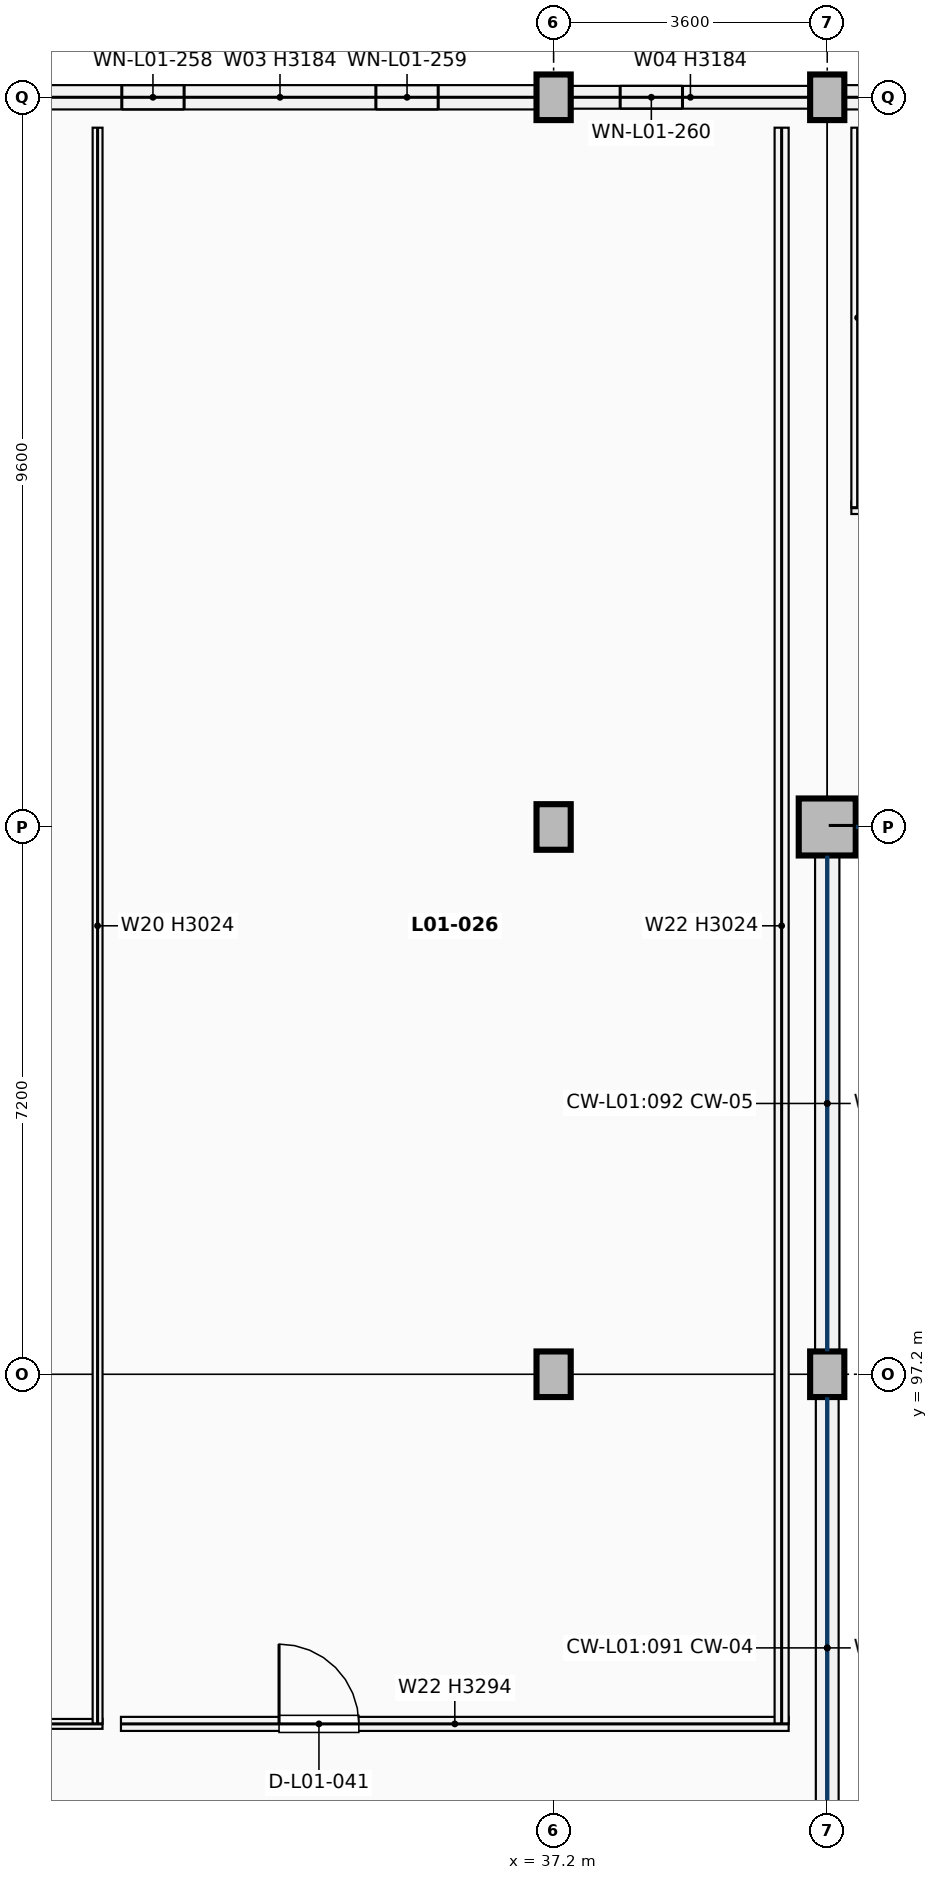
"""IFC4 building model, lengths in metres.
Left out: names, types, materials, properties, quantities, classifications, styles, units other than length and angle.
Written with IfcOpenShell. Run it as: python <this file> out.ifc"""

import sys

from ifc_helpers import new_model, si_unit, direction, frame, frame_2d, origin, origin_2d, place, context, subcontext, project, spatial, rectangle, extrude, element, fill, save


model = new_model("IFC4")
c1 = context("Model", 3, precision=1e-05, world=origin(), true_north=direction((0.0, 1.0)))
c2 = subcontext(c1, "Body", "Model", "MODEL_VIEW")
j1 = project(units=[si_unit("LENGTHUNIT", "METRE"), si_unit("PLANEANGLEUNIT", "RADIAN")], contexts=[c1])
p1 = place(None, origin())
s1 = spatial("IfcSite", under=j1, at=p1, CompositionType="ELEMENT")
p2 = place(p1, origin())
s2 = spatial("IfcBuilding", under=s1, at=p2, CompositionType="ELEMENT")
p3 = place(p2, frame((0.0, 0.0, 5.1)))
s3 = spatial("IfcBuildingStorey", under=s2, at=p3, CompositionType="ELEMENT", Elevation=5.1)
for number, where, z_axis, x_axis in (
    (1, (37.2, 97.2, 0.0), (0.0, 0.0, 1.0), (1.0, 0.0, 0.0)),
    (2, (37.2, 104.4, 0.0), (0.0, 0.0, 1.0), (1.0, 0.0, 0.0)),
    (3, (37.2, 114.0, 0.0), (0.0, 0.0, 1.0), (1.0, 0.0, 0.0)),
    (4, (40.8, 97.2, 0.0), (0.0, 0.0, 1.0), (1.0, 0.0, 0.0)),
):
    element("IfcColumn", number, at=place(p3, frame(where, z_axis=z_axis, x_axis=x_axis)), inside=s3, PredefinedType="COLUMN", context=c2, shape_type="SweptSolid", body=[
        extrude(rectangle(XDim=0.45, YDim=0.6, at=origin_2d()), origin(), (0.0, 0.0, 1.0), 4.42),
    ])
p4 = place(p3, frame((40.8, 104.4, 0.0), z_axis=(0.0, 0.0, 1.0), x_axis=(1.0, 0.0, 0.0)))
e5 = element("IfcColumn", 5, at=p4, inside=s3, PredefinedType="COLUMN", context=c2, shape_type="SweptSolid", body=[
    extrude(rectangle(XDim=0.75, YDim=0.75, at=origin_2d()), origin(), (0.0, 0.0, 1.0), 4.42),
])
p5 = place(p3, frame((40.8, 114.0, 0.0), z_axis=(0.0, 0.0, 1.0), x_axis=(1.0, 0.0, 0.0)))
e6 = element("IfcColumn", 6, at=p5, inside=s3, PredefinedType="COLUMN", context=c2, shape_type="SweptSolid", body=[
    extrude(rectangle(XDim=0.45, YDim=0.6, at=origin_2d()), origin(), (0.0, 0.0, 1.0), 4.42),
])
p6 = place(p3, frame((30.227, 114.0, 0.0), z_axis=(0.0, 0.0, 1.0), x_axis=(1.0, 0.0, 0.0)))
e7 = element("IfcWall", 7, at=p6, inside=s3, PredefinedType="SOLIDWALL", context=c2, shape_type="SweptSolid", body=[
    extrude(rectangle(XDim=6.746, YDim=0.32, at=frame_2d((3.373, 0.0))), origin(), (0.0, 0.0, 1.0), 3.184),
])
p7 = place(p6, frame((1.292, 0.0, 0.75)))
e8 = element("IfcOpeningElement", 8, at=p7, cuts=e7, PredefinedType="OPENING", context=c2, shape_type="SweptSolid", body=[
    extrude(rectangle(XDim=0.82, YDim=2.22, at=frame_2d((0.41, 1.11))), frame((0.0, 0.17, 0.0), z_axis=(0.0, -1.0, 0.0), x_axis=(1.0, 0.0, 0.0)), (0.0, 0.0, 1.0), 0.34),
])
p8 = place(p6, frame((4.635, 0.0, 0.75)))
e9 = element("IfcOpeningElement", 9, at=p8, cuts=e7, PredefinedType="OPENING", context=c2, shape_type="SweptSolid", body=[
    extrude(rectangle(XDim=0.82, YDim=2.22, at=frame_2d((0.41, 1.11))), frame((0.0, 0.17, 0.0), z_axis=(0.0, -1.0, 0.0), x_axis=(1.0, 0.0, 0.0)), (0.0, 0.0, 1.0), 0.34),
])
p9 = place(p3, frame((37.427, 114.0, 0.0), z_axis=(0.0, 0.0, 1.0), x_axis=(1.0, 0.0, 0.0)))
e10 = element("IfcWall", 10, at=p9, inside=s3, PredefinedType="SOLIDWALL", context=c2, shape_type="SweptSolid", body=[
    extrude(rectangle(XDim=3.146, YDim=0.3, at=frame_2d((1.573, 0.0))), origin(), (0.0, 0.0, 1.0), 3.184),
])
p10 = place(p9, frame((0.649, 0.0, 0.75)))
e11 = element("IfcOpeningElement", 11, at=p10, cuts=e10, PredefinedType="OPENING", context=c2, shape_type="SweptSolid", body=[
    extrude(rectangle(XDim=0.82, YDim=1.82, at=frame_2d((0.41, 0.91))), frame((0.0, 0.16, 0.0), z_axis=(0.0, -1.0, 0.0), x_axis=(1.0, 0.0, 0.0)), (0.0, 0.0, 1.0), 0.32),
])
p11 = place(p3, frame((41.027, 114.0, 0.0), z_axis=(0.0, 0.0, 1.0), x_axis=(1.0, 0.0, 0.0)))
e12 = element("IfcWall", 12, at=p11, inside=s3, PredefinedType="SOLIDWALL", context=c2, shape_type="SweptSolid", body=[
    extrude(rectangle(XDim=6.746, YDim=0.32, at=frame_2d((3.373, 0.0))), origin(), (0.0, 0.0, 1.0), 3.184),
])
p12 = place(p11, frame((1.171, 0.0, 0.75)))
e13 = element("IfcOpeningElement", 13, at=p12, cuts=e12, PredefinedType="OPENING", context=c2, shape_type="SweptSolid", body=[
    extrude(rectangle(XDim=0.98, YDim=2.28, at=frame_2d((0.49, 1.14))), frame((0.0, 0.17, 0.0), z_axis=(0.0, -1.0, 0.0), x_axis=(1.0, 0.0, 0.0)), (0.0, 0.0, 1.0), 0.34),
])
p13 = place(p11, frame((4.594, 0.0, 0.75)))
e14 = element("IfcOpeningElement", 14, at=p13, cuts=e12, PredefinedType="OPENING", context=c2, shape_type="SweptSolid", body=[
    extrude(rectangle(XDim=0.98, YDim=2.28, at=frame_2d((0.49, 1.14))), frame((0.0, 0.17, 0.0), z_axis=(0.0, -1.0, 0.0), x_axis=(1.0, 0.0, 0.0)), (0.0, 0.0, 1.0), 0.34),
])
p14 = place(p3, frame((41.177, 104.4, 0.0), z_axis=(0.0, 0.0, 1.0), x_axis=(1.0, 0.0, 0.0)))
e15 = element("IfcWall", 15, at=p14, inside=s3, PredefinedType="SOLIDWALL", context=c2, shape_type="SweptSolid", body=[
    extrude(rectangle(XDim=6.446, YDim=0.3, at=frame_2d((3.223, 0.0))), origin(), (0.0, 0.0, 1.0), 0.85),
])
p15 = place(p3, frame((40.8, 90.302, 0.0), z_axis=(0.0, 0.0, 1.0), x_axis=(0.0, 1.0, 0.0)))
e16 = element("IfcWall", 16, at=p15, inside=s3, PredefinedType="SOLIDWALL", context=c2, shape_type="SweptSolid", body=[
    extrude(rectangle(XDim=6.596, YDim=0.3, at=frame_2d((3.298, 0.0))), origin(), (0.0, 0.0, 1.0), 0.85),
])
p16 = place(p3, frame((40.8, 97.502, 0.0), z_axis=(0.0, 0.0, 1.0), x_axis=(0.0, 1.0, 0.0)))
e17 = element("IfcWall", 17, at=p16, inside=s3, PredefinedType="SOLIDWALL", context=c2, shape_type="SweptSolid", body=[
    extrude(rectangle(XDim=6.521, YDim=0.32, at=frame_2d((3.26, 0.0))), origin(), (0.0, 0.0, 1.0), 0.85),
])
p17 = place(p3, frame((22.335, 92.6, 0.0), z_axis=(0.0, 0.0, 1.0), x_axis=(1.0, 0.0, 0.0)))
e18 = element("IfcWall", 18, at=p17, inside=s3, PredefinedType="PARTITIONING", context=c2, shape_type="SweptSolid", body=[
    extrude(rectangle(XDim=8.93, YDim=0.13, at=frame_2d((4.465, 0.0))), origin(), (0.0, 0.0, 1.0), 3.184),
])
p18 = place(p17, frame((3.775, 0.0, 0.0)))
e19 = element("IfcOpeningElement", 19, at=p18, cuts=e18, PredefinedType="OPENING", context=c2, shape_type="SweptSolid", body=[
    extrude(rectangle(XDim=1.38, YDim=2.28, at=frame_2d((0.69, 1.14))), frame((0.0, 0.075, 0.0), z_axis=(0.0, -1.0, 0.0), x_axis=(1.0, 0.0, 0.0)), (0.0, 0.0, 1.0), 0.15),
])
p19 = place(p3, frame((31.2, 92.6, 0.0), z_axis=(0.0, 0.0, 1.0), x_axis=(0.0, 1.0, 0.0)))
e20 = element("IfcWall", 20, at=p19, inside=s3, PredefinedType="PARTITIONING", context=c2, shape_type="SweptSolid", body=[
    extrude(rectangle(XDim=21.0, YDim=0.13, at=frame_2d((10.5, 0.0))), origin(), (0.0, 0.0, 1.0), 3.024),
])
p20 = place(p3, frame((31.508, 92.6, 0.0), z_axis=(0.0, 0.0, 1.0), x_axis=(1.0, 0.0, 0.0)))
e21 = element("IfcWall", 21, at=p20, inside=s3, PredefinedType="PARTITIONING", context=c2, shape_type="SweptSolid", body=[
    extrude(rectangle(XDim=8.785, YDim=0.185, at=frame_2d((4.393, 0.0))), origin(), (0.0, 0.0, 1.0), 3.294),
])
p21 = place(p20, frame((2.08, 0.0, 0.0)))
e22 = element("IfcOpeningElement", 22, at=p21, cuts=e21, PredefinedType="OPENING", context=c2, shape_type="SweptSolid", body=[
    extrude(rectangle(XDim=1.05, YDim=2.15, at=frame_2d((0.525, 1.075))), frame((0.0, 0.103, 0.0), z_axis=(0.0, -1.0, 0.0), x_axis=(1.0, 0.0, 0.0)), (0.0, 0.0, 1.0), 0.205),
])
p22 = place(p3, frame((40.2, 92.6, 0.0), z_axis=(0.0, 0.0, 1.0), x_axis=(0.0, 1.0, 0.0)))
e23 = element("IfcWall", 23, at=p22, inside=s3, PredefinedType="PARTITIONING", context=c2, shape_type="SweptSolid", body=[
    extrude(rectangle(XDim=21.0, YDim=0.185, at=frame_2d((10.5, 0.0))), origin(), (0.0, 0.0, 1.0), 3.024),
])
p23 = place(p3, frame((41.117, 108.6, 0.0), z_axis=(0.0, 0.0, 1.0), x_axis=(1.0, 0.0, 0.0)))
e24 = element("IfcWall", 24, at=p23, inside=s3, PredefinedType="PARTITIONING", context=c2, shape_type="SweptSolid", body=[
    extrude(rectangle(XDim=22.965, YDim=0.165, at=frame_2d((11.482, 0.0))), origin(), (0.0, 0.0, 1.0), 3.184),
])
p24 = place(p23, frame((16.377, 0.0, 0.0)))
e25 = element("IfcOpeningElement", 25, at=p24, cuts=e24, PredefinedType="OPENING", context=c2, shape_type="SweptSolid", body=[
    extrude(rectangle(XDim=0.94, YDim=2.1, at=frame_2d((0.47, 1.05))), frame((0.0, 0.093, 0.0), z_axis=(0.0, -1.0, 0.0), x_axis=(1.0, 0.0, 0.0)), (0.0, 0.0, 1.0), 0.185),
])
p25 = place(p3, frame((41.2, 108.6, 0.0), z_axis=(0.0, 0.0, 1.0), x_axis=(0.0, 1.0, 0.0)))
e26 = element("IfcWall", 26, at=p25, inside=s3, PredefinedType="PARTITIONING", context=c2, shape_type="SweptSolid", body=[
    extrude(rectangle(XDim=5.0, YDim=0.165, at=frame_2d((2.5, 0.0))), origin(), (0.0, 0.0, 1.0), 3.694),
])
p26 = place(p7, origin())
e27 = element("IfcWindow", 27, at=p26, inside=s3, PartitioningType="SINGLE_PANEL", PredefinedType="WINDOW", context=c2, shape_type="SweptSolid", body=[
    extrude(rectangle(XDim=0.82, YDim=2.22, at=frame_2d((0.41, 1.11))), frame((0.0, 0.03, 0.0), z_axis=(0.0, -1.0, 0.0), x_axis=(1.0, 0.0, 0.0)), (0.0, 0.0, 1.0), 0.06),
])
fill(e8, e27)
p27 = place(p8, origin())
e28 = element("IfcWindow", 28, at=p27, inside=s3, PartitioningType="SINGLE_PANEL", PredefinedType="WINDOW", context=c2, shape_type="SweptSolid", body=[
    extrude(rectangle(XDim=0.82, YDim=2.22, at=frame_2d((0.41, 1.11))), frame((0.0, 0.03, 0.0), z_axis=(0.0, -1.0, 0.0), x_axis=(1.0, 0.0, 0.0)), (0.0, 0.0, 1.0), 0.06),
])
fill(e9, e28)
p28 = place(p10, origin())
e29 = element("IfcWindow", 29, at=p28, inside=s3, PartitioningType="SINGLE_PANEL", PredefinedType="WINDOW", context=c2, shape_type="SweptSolid", body=[
    extrude(rectangle(XDim=0.82, YDim=1.82, at=frame_2d((0.41, 0.91))), frame((0.0, 0.03, 0.0), z_axis=(0.0, -1.0, 0.0), x_axis=(1.0, 0.0, 0.0)), (0.0, 0.0, 1.0), 0.06),
])
fill(e11, e29)
p29 = place(p21, origin())
e30 = element("IfcDoor", 30, at=p29, inside=s3, OperationType="SINGLE_SWING_LEFT", PredefinedType="DOOR", context=c2, shape_type="SweptSolid", body=[
    extrude(rectangle(XDim=1.05, YDim=2.15, at=frame_2d((0.525, 1.075))), frame((0.0, 0.025, 0.0), z_axis=(0.0, -1.0, 0.0), x_axis=(1.0, 0.0, 0.0)), (0.0, 0.0, 1.0), 0.05),
])
fill(e22, e30)
save(model, sys.argv[1])
